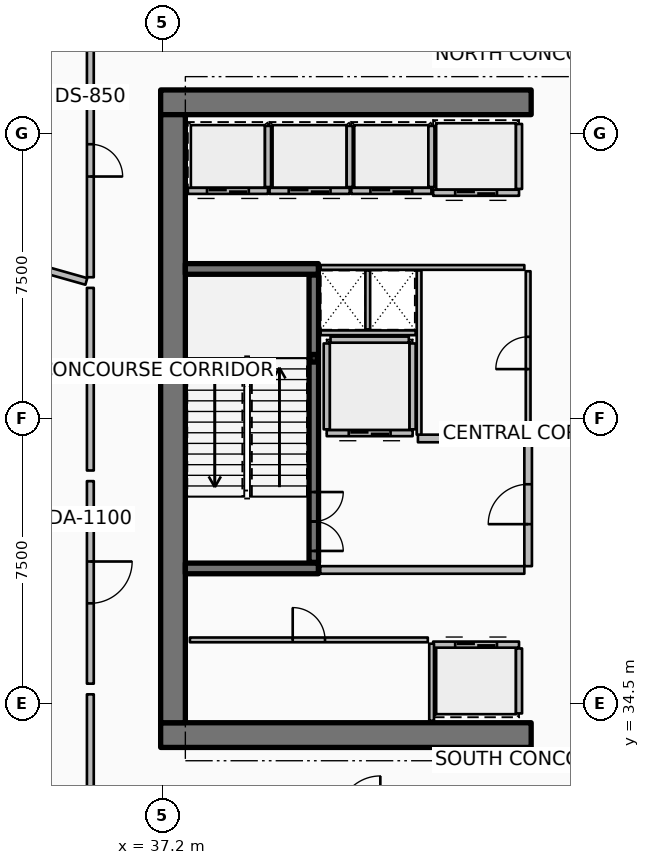
"""IFC4 building model, lengths in metres.
Left out: names, types, materials, properties, quantities, classifications, styles, units other than length and angle.
Written with IfcOpenShell. Run it as: python <this file> out.ifc"""

import sys

from ifc_helpers import new_model, si_unit, direction, frame, frame_2d, origin, origin_2d, place, context, subcontext, project, spatial, rectangle, hollow_rectangle, extrude, element, fill, save


model = new_model("IFC4")
c1 = context("Model", 3, precision=1e-05, world=origin(), true_north=direction((0.0, 1.0)))
c2 = subcontext(c1, "Body", "Model", "MODEL_VIEW")
j1 = project(units=[si_unit("LENGTHUNIT", "METRE"), si_unit("PLANEANGLEUNIT", "RADIAN")], contexts=[c1])
p1 = place(None, origin())
s1 = spatial("IfcSite", under=j1, at=p1, CompositionType="ELEMENT")
p2 = place(p1, origin())
s2 = spatial("IfcBuilding", under=s1, at=p2, CompositionType="ELEMENT")
p3 = place(p2, frame((0.0, 0.0, 231.9)))
s3 = spatial("IfcBuildingStorey", under=s2, at=p3, CompositionType="ELEMENT", Elevation=231.9)
for number, where, z_axis, x_axis in (
    (1, (37.15, 33.675, 0.0), (0.0, 0.0, 1.0), (1.0, 0.0, 0.0)),
    (2, (37.15, 50.325, 0.0), (0.0, 0.0, 1.0), (1.0, 0.0, 0.0)),
):
    element("IfcWall", number, at=place(p3, frame(where, z_axis=z_axis, x_axis=x_axis)), inside=s3, PredefinedType="SHEAR", context=c2, shape_type="SweptSolid", body=[
        extrude(rectangle(XDim=9.75, YDim=0.65, at=frame_2d((4.875, 0.0))), origin(), (0.0, 0.0, 1.0), 4.8),
    ])
p4 = place(p3, frame((37.475, 34.0, 0.0), z_axis=(0.0, 0.0, 1.0), x_axis=(0.0, 1.0, 0.0)))
e3 = element("IfcWall", 3, at=p4, inside=s3, PredefinedType="SHEAR", context=c2, shape_type="SweptSolid", body=[
    extrude(rectangle(XDim=16.0, YDim=0.65, at=frame_2d((8.0, 0.0))), origin(), (0.0, 0.0, 1.0), 4.8),
])
for number, where, z_axis, x_axis in (
    (4, (37.8, 38.06, 0.0), (0.0, 0.0, 1.0), (1.0, 0.0, 0.0)),
    (5, (37.8, 45.94, 0.0), (0.0, 0.0, 1.0), (1.0, 0.0, 0.0)),
):
    element("IfcWall", number, at=place(p3, frame(where, z_axis=z_axis, x_axis=x_axis)), inside=s3, PredefinedType="SHEAR", context=c2, shape_type="SweptSolid", body=[
        extrude(rectangle(XDim=3.5, YDim=0.28, at=frame_2d((1.75, 0.0))), origin(), (0.0, 0.0, 1.0), 4.8),
    ])
p5 = place(p3, frame((41.18, 43.59, 0.0), z_axis=(0.0, 0.0, 1.0), x_axis=(1.0, 0.0, 0.0)))
e6 = element("IfcColumn", 6, at=p5, inside=s3, PredefinedType="COLUMN", context=c2, shape_type="SweptSolid", body=[
    extrude(hollow_rectangle(XDim=0.2, YDim=0.2, WallThickness=0.01, InnerFilletRadius=0.01, OuterFilletRadius=0.02, at=origin_2d()), origin(), (0.0, 0.0, 1.0), 2.195),
])
p6 = place(p3, frame((41.18, 38.22, 0.0), z_axis=(0.0, 0.0, 1.0), x_axis=(0.0, 1.0, 0.0)))
e7 = element("IfcWall", 7, at=p6, inside=s3, PredefinedType="SOLIDWALL", context=c2, shape_type="SweptSolid", body=[
    extrude(rectangle(XDim=7.56, YDim=0.25, at=frame_2d((3.78, 0.0))), origin(), (0.0, 0.0, 1.0), 4.4),
])
p7 = place(p6, frame((0.3, 0.0, 0.0)))
e8 = element("IfcOpeningElement", 8, at=p7, cuts=e7, PredefinedType="OPENING", context=c2, shape_type="SweptSolid", body=[
    extrude(rectangle(XDim=1.55, YDim=2.15, at=frame_2d((0.775, 1.075))), frame((0.0, 0.135, 0.0), z_axis=(0.0, -1.0, 0.0), x_axis=(1.0, 0.0, 0.0)), (0.0, 0.0, 1.0), 0.27),
])
p8 = place(p3, frame((39.975, 47.995, 0.0), z_axis=(0.0, 0.0, 1.0), x_axis=(-1.0, 0.0, 0.0)))
e9 = element("IfcWall", 9, at=p8, inside=s3, PredefinedType="PARTITIONING", context=c2, shape_type="SweptSolid", body=[
    extrude(rectangle(XDim=2.11, YDim=0.16, at=frame_2d((1.055, 0.0))), origin(), (0.0, 0.0, 1.0), 4.4),
])
p9 = place(p8, frame((0.505, 0.0, 0.0)))
e10 = element("IfcOpeningElement", 10, at=p9, cuts=e9, PredefinedType="OPENING", context=c2, shape_type="SweptSolid", body=[
    extrude(rectangle(XDim=1.1, YDim=2.1, at=frame_2d((0.55, 1.05))), frame((0.0, 0.09, 0.0), z_axis=(0.0, -1.0, 0.0), x_axis=(1.0, 0.0, 0.0)), (0.0, 0.0, 1.0), 0.18),
])
p10 = place(p3, frame((39.975, 48.095, 0.0), z_axis=(0.0, 0.0, 1.0), x_axis=(0.0, 1.0, 0.0)))
e11 = element("IfcWall", 11, at=p10, inside=s3, PredefinedType="PARTITIONING", context=c2, shape_type="SweptSolid", body=[
    extrude(rectangle(XDim=1.61, YDim=0.16, at=frame_2d((0.805, 0.0))), origin(), (0.0, 0.0, 1.0), 4.4),
])
p11 = place(p3, frame((42.125, 47.995, 0.0), z_axis=(0.0, 0.0, 1.0), x_axis=(-1.0, 0.0, 0.0)))
e12 = element("IfcWall", 12, at=p11, inside=s3, PredefinedType="PARTITIONING", context=c2, shape_type="SweptSolid", body=[
    extrude(rectangle(XDim=2.11, YDim=0.16, at=frame_2d((1.055, 0.0))), origin(), (0.0, 0.0, 1.0), 4.4),
])
p12 = place(p11, frame((0.505, 0.0, 0.0)))
e13 = element("IfcOpeningElement", 13, at=p12, cuts=e12, PredefinedType="OPENING", context=c2, shape_type="SweptSolid", body=[
    extrude(rectangle(XDim=1.1, YDim=2.1, at=frame_2d((0.55, 1.05))), frame((0.0, 0.09, 0.0), z_axis=(0.0, -1.0, 0.0), x_axis=(1.0, 0.0, 0.0)), (0.0, 0.0, 1.0), 0.18),
])
p13 = place(p3, frame((42.125, 48.095, 0.0), z_axis=(0.0, 0.0, 1.0), x_axis=(0.0, 1.0, 0.0)))
e14 = element("IfcWall", 14, at=p13, inside=s3, PredefinedType="PARTITIONING", context=c2, shape_type="SweptSolid", body=[
    extrude(rectangle(XDim=1.61, YDim=0.16, at=frame_2d((0.805, 0.0))), origin(), (0.0, 0.0, 1.0), 4.4),
])
p14 = place(p3, frame((44.275, 47.995, 0.0), z_axis=(0.0, 0.0, 1.0), x_axis=(-1.0, 0.0, 0.0)))
e15 = element("IfcWall", 15, at=p14, inside=s3, PredefinedType="PARTITIONING", context=c2, shape_type="SweptSolid", body=[
    extrude(rectangle(XDim=2.11, YDim=0.16, at=frame_2d((1.055, 0.0))), origin(), (0.0, 0.0, 1.0), 4.4),
])
p15 = place(p14, frame((0.505, 0.0, 0.0)))
e16 = element("IfcOpeningElement", 16, at=p15, cuts=e15, PredefinedType="OPENING", context=c2, shape_type="SweptSolid", body=[
    extrude(rectangle(XDim=1.1, YDim=2.1, at=frame_2d((0.55, 1.05))), frame((0.0, 0.09, 0.0), z_axis=(0.0, -1.0, 0.0), x_axis=(1.0, 0.0, 0.0)), (0.0, 0.0, 1.0), 0.18),
])
p16 = place(p3, frame((44.275, 48.095, 0.0), z_axis=(0.0, 0.0, 1.0), x_axis=(0.0, 1.0, 0.0)))
e17 = element("IfcWall", 17, at=p16, inside=s3, PredefinedType="PARTITIONING", context=c2, shape_type="SweptSolid", body=[
    extrude(rectangle(XDim=1.61, YDim=0.16, at=frame_2d((0.805, 0.0))), origin(), (0.0, 0.0, 1.0), 4.4),
])
p17 = place(p3, frame((46.58, 47.945, 0.0), z_axis=(0.0, 0.0, 1.0), x_axis=(-1.0, 0.0, 0.0)))
e18 = element("IfcWall", 18, at=p17, inside=s3, PredefinedType="PARTITIONING", context=c2, shape_type="SweptSolid", body=[
    extrude(rectangle(XDim=2.26, YDim=0.16, at=frame_2d((1.13, 0.0))), origin(), (0.0, 0.0, 1.0), 4.4),
])
p18 = place(p17, frame((0.58, 0.0, 0.0)))
e19 = element("IfcOpeningElement", 19, at=p18, cuts=e18, PredefinedType="OPENING", context=c2, shape_type="SweptSolid", body=[
    extrude(rectangle(XDim=1.1, YDim=2.1, at=frame_2d((0.55, 1.05))), frame((0.0, 0.09, 0.0), z_axis=(0.0, -1.0, 0.0), x_axis=(1.0, 0.0, 0.0)), (0.0, 0.0, 1.0), 0.18),
])
p19 = place(p3, frame((46.58, 48.045, 0.0), z_axis=(0.0, 0.0, 1.0), x_axis=(0.0, 1.0, 0.0)))
e20 = element("IfcWall", 20, at=p19, inside=s3, PredefinedType="PARTITIONING", context=c2, shape_type="SweptSolid", body=[
    extrude(rectangle(XDim=1.71, YDim=0.16, at=frame_2d((0.855, 0.0))), origin(), (0.0, 0.0, 1.0), 4.4),
])
p20 = place(p3, frame((44.32, 36.055, 0.0), z_axis=(0.0, 0.0, 1.0), x_axis=(1.0, 0.0, 0.0)))
e21 = element("IfcWall", 21, at=p20, inside=s3, PredefinedType="PARTITIONING", context=c2, shape_type="SweptSolid", body=[
    extrude(rectangle(XDim=2.26, YDim=0.16, at=frame_2d((1.13, 0.0))), origin(), (0.0, 0.0, 1.0), 4.4),
])
p21 = place(p20, frame((0.58, 0.0, 0.0)))
e22 = element("IfcOpeningElement", 22, at=p21, cuts=e21, PredefinedType="OPENING", context=c2, shape_type="SweptSolid", body=[
    extrude(rectangle(XDim=1.1, YDim=2.1, at=frame_2d((0.55, 1.05))), frame((0.0, 0.09, 0.0), z_axis=(0.0, -1.0, 0.0), x_axis=(1.0, 0.0, 0.0)), (0.0, 0.0, 1.0), 0.18),
])
p22 = place(p3, frame((46.58, 34.245, 0.0), z_axis=(0.0, 0.0, 1.0), x_axis=(0.0, 1.0, 0.0)))
e23 = element("IfcWall", 23, at=p22, inside=s3, PredefinedType="PARTITIONING", context=c2, shape_type="SweptSolid", body=[
    extrude(rectangle(XDim=1.71, YDim=0.16, at=frame_2d((0.855, 0.0))), origin(), (0.0, 0.0, 1.0), 4.4),
])
p23 = place(p3, frame((43.78, 41.62, 0.0), z_axis=(0.0, 0.0, 1.0), x_axis=(-1.0, 0.0, 0.0)))
e24 = element("IfcWall", 24, at=p23, inside=s3, PredefinedType="PARTITIONING", context=c2, shape_type="SweptSolid", body=[
    extrude(rectangle(XDim=2.26, YDim=0.16, at=frame_2d((1.13, 0.0))), origin(), (0.0, 0.0, 1.0), 4.4),
])
p24 = place(p23, frame((0.58, 0.0, 0.0)))
e25 = element("IfcOpeningElement", 25, at=p24, cuts=e24, PredefinedType="OPENING", context=c2, shape_type="SweptSolid", body=[
    extrude(rectangle(XDim=1.1, YDim=2.1, at=frame_2d((0.55, 1.05))), frame((0.0, 0.09, 0.0), z_axis=(0.0, -1.0, 0.0), x_axis=(1.0, 0.0, 0.0)), (0.0, 0.0, 1.0), 0.18),
])
for number, where, z_axis, x_axis in (
    (26, (43.78, 41.72, 0.0), (0.0, 0.0, 1.0), (0.0, 1.0, 0.0)),
    (27, (41.52, 41.72, 0.0), (0.0, 0.0, 1.0), (0.0, 1.0, 0.0)),
):
    element("IfcWall", number, at=place(p3, frame(where, z_axis=z_axis, x_axis=x_axis)), inside=s3, PredefinedType="PARTITIONING", context=c2, shape_type="SweptSolid", body=[
        extrude(rectangle(XDim=2.26, YDim=0.16, at=frame_2d((1.13, 0.0))), origin(), (0.0, 0.0, 1.0), 4.4),
    ])
p25 = place(p3, frame((41.62, 44.08, 0.0), z_axis=(0.0, 0.0, 1.0), x_axis=(1.0, 0.0, 0.0)))
e28 = element("IfcWall", 28, at=p25, inside=s3, PredefinedType="PARTITIONING", context=c2, shape_type="SweptSolid", body=[
    extrude(rectangle(XDim=2.06, YDim=0.16, at=frame_2d((1.03, 0.0))), origin(), (0.0, 0.0, 1.0), 4.4),
])
p26 = place(p3, frame((44.28, 34.05, 0.0), z_axis=(0.0, 0.0, 1.0), x_axis=(0.0, 1.0, 0.0)))
e29 = element("IfcWall", 29, at=p26, inside=s3, PredefinedType="PARTITIONING", context=c2, shape_type="SweptSolid", body=[
    extrude(rectangle(XDim=2.03, YDim=0.125, at=frame_2d((1.015, 0.0))), origin(), (0.0, 0.0, 1.0), 3.84),
])
p27 = place(p3, frame((37.92, 36.18, 0.0), z_axis=(0.0, 0.0, 1.0), x_axis=(1.0, 0.0, 0.0)))
e30 = element("IfcWall", 30, at=p27, inside=s3, PredefinedType="PARTITIONING", context=c2, shape_type="SweptSolid", body=[
    extrude(rectangle(XDim=6.26, YDim=0.125, at=frame_2d((3.13, 0.0))), origin(), (0.0, 0.0, 1.0), 3.84),
])
p28 = place(p27, frame((2.705, 0.0, 0.0)))
e31 = element("IfcOpeningElement", 31, at=p28, cuts=e30, PredefinedType="OPENING", context=c2, shape_type="SweptSolid", body=[
    extrude(rectangle(XDim=0.85, YDim=2.06, at=frame_2d((0.425, 1.03))), frame((0.0, 0.073, 0.0), z_axis=(0.0, -1.0, 0.0), x_axis=(1.0, 0.0, 0.0)), (0.0, 0.0, 1.0), 0.145),
])
p29 = place(p3, frame((41.35, 38.02, 0.0), z_axis=(0.0, 0.0, 1.0), x_axis=(1.0, 0.0, 0.0)))
e32 = element("IfcWall", 32, at=p29, inside=s3, PredefinedType="PARTITIONING", context=c2, shape_type="SweptSolid", body=[
    extrude(rectangle(XDim=5.37, YDim=0.2, at=frame_2d((2.685, 0.0))), origin(), (0.0, 0.0, 1.0), 4.4),
])
p30 = place(p3, frame((43.92, 41.48, 0.0), z_axis=(0.0, 0.0, 1.0), x_axis=(1.0, 0.0, 0.0)))
e33 = element("IfcWall", 33, at=p30, inside=s3, PredefinedType="PARTITIONING", context=c2, shape_type="SweptSolid", body=[
    extrude(rectangle(XDim=2.8, YDim=0.2, at=frame_2d((1.4, 0.0))), origin(), (0.0, 0.0, 1.0), 4.4),
])
p31 = place(p3, frame((46.82, 38.12, 0.0), z_axis=(0.0, 0.0, 1.0), x_axis=(0.0, 1.0, 0.0)))
e34 = element("IfcWall", 34, at=p31, inside=s3, PredefinedType="PARTITIONING", context=c2, shape_type="SweptSolid", body=[
    extrude(rectangle(XDim=3.26, YDim=0.2, at=frame_2d((1.63, 0.0))), origin(), (0.0, 0.0, 1.0), 4.4),
])
p32 = place(p31, frame((1.105, 0.0, 0.0)))
e35 = element("IfcOpeningElement", 35, at=p32, cuts=e34, PredefinedType="OPENING", context=c2, shape_type="SweptSolid", body=[
    extrude(rectangle(XDim=1.05, YDim=2.1, at=frame_2d((0.525, 1.05))), frame((0.0, 0.11, 0.0), z_axis=(0.0, -1.0, 0.0), x_axis=(1.0, 0.0, 0.0)), (0.0, 0.0, 1.0), 0.22),
])
p33 = place(p3, frame((41.36, 45.98, 0.0), z_axis=(0.0, 0.0, 1.0), x_axis=(1.0, 0.0, 0.0)))
e36 = element("IfcWall", 36, at=p33, inside=s3, PredefinedType="PARTITIONING", context=c2, shape_type="SweptSolid", body=[
    extrude(rectangle(XDim=5.36, YDim=0.125, at=frame_2d((2.68, 0.0))), origin(), (0.0, 0.0, 1.0), 3.84),
])
p34 = place(p3, frame((41.36, 44.26, 0.0), z_axis=(0.0, 0.0, 1.0), x_axis=(1.0, 0.0, 0.0)))
e37 = element("IfcWall", 37, at=p34, inside=s3, PredefinedType="PARTITIONING", context=c2, shape_type="SweptSolid", body=[
    extrude(rectangle(XDim=2.5, YDim=0.125, at=frame_2d((1.25, 0.0))), origin(), (0.0, 0.0, 1.0), 3.84),
])
p35 = place(p3, frame((42.6, 44.35, 0.0), z_axis=(0.0, 0.0, 1.0), x_axis=(0.0, 1.0, 0.0)))
e38 = element("IfcWall", 38, at=p35, inside=s3, PredefinedType="PARTITIONING", context=c2, shape_type="SweptSolid", body=[
    extrude(rectangle(XDim=1.55, YDim=0.125, at=frame_2d((0.775, 0.0))), origin(), (0.0, 0.0, 1.0), 3.84),
])
p36 = place(p3, frame((43.95, 41.58, 0.0), z_axis=(0.0, 0.0, 1.0), x_axis=(0.0, 1.0, 0.0)))
e39 = element("IfcWall", 39, at=p36, inside=s3, PredefinedType="PARTITIONING", context=c2, shape_type="SweptSolid", body=[
    extrude(rectangle(XDim=4.32, YDim=0.125, at=frame_2d((2.16, 0.0))), origin(), (0.0, 0.0, 1.0), 3.84),
])
p37 = place(p3, frame((46.82, 41.58, 0.0), z_axis=(0.0, 0.0, 1.0), x_axis=(0.0, 1.0, 0.0)))
e40 = element("IfcWall", 40, at=p37, inside=s3, PredefinedType="PARTITIONING", context=c2, shape_type="SweptSolid", body=[
    extrude(rectangle(XDim=4.3, YDim=0.125, at=frame_2d((2.15, 0.0))), origin(), (0.0, 0.0, 1.0), 3.84),
])
p38 = place(p37, frame((1.725, 0.0, 0.0)))
e41 = element("IfcOpeningElement", 41, at=p38, cuts=e40, PredefinedType="OPENING", context=c2, shape_type="SweptSolid", body=[
    extrude(rectangle(XDim=0.85, YDim=2.06, at=frame_2d((0.425, 1.03))), frame((0.0, 0.073, 0.0), z_axis=(0.0, -1.0, 0.0), x_axis=(1.0, 0.0, 0.0)), (0.0, 0.0, 1.0), 0.145),
])
p39 = place(p3, frame((35.3, 51.872, 0.0), z_axis=(0.0, 0.0, 1.0), x_axis=(0.0, -1.0, 0.0)))
e42 = element("IfcWall", 42, at=p39, inside=s3, PredefinedType="PARTITIONING", context=c2, shape_type="SweptSolid", body=[
    extrude(rectangle(XDim=6.15, YDim=0.18, at=frame_2d((3.075, 0.0))), origin(), (0.0, 0.0, 1.0), 3.357),
])
p40 = place(p39, frame((2.65, 0.0, 0.0)))
e43 = element("IfcOpeningElement", 43, at=p40, cuts=e42, PredefinedType="OPENING", context=c2, shape_type="SweptSolid", body=[
    extrude(rectangle(XDim=0.85, YDim=2.06, at=frame_2d((0.425, 1.03))), frame((0.0, 0.1, 0.0), z_axis=(0.0, -1.0, 0.0), x_axis=(1.0, 0.0, 0.0)), (0.0, 0.0, 1.0), 0.2),
])
p41 = place(p3, frame((35.194, 45.612, 0.0), z_axis=(0.0, 0.0, 1.0), x_axis=(-0.962460537185, 0.271421654186, 0.0)))
e44 = element("IfcWall", 44, at=p41, inside=s3, PredefinedType="PARTITIONING", context=c2, shape_type="SweptSolid", body=[
    extrude(rectangle(XDim=15.057, YDim=0.18, at=frame_2d((7.529, 0.0))), origin(), (0.0, 0.0, 1.0), 3.357),
])
p42 = place(p3, frame((35.3, 45.442, 0.0), z_axis=(0.0, 0.0, 1.0), x_axis=(0.0, -1.0, 0.0)))
e45 = element("IfcWall", 45, at=p42, inside=s3, PredefinedType="PARTITIONING", context=c2, shape_type="SweptSolid", body=[
    extrude(rectangle(XDim=4.805, YDim=0.18, at=frame_2d((2.402, 0.0))), origin(), (0.0, 0.0, 1.0), 3.357),
])
p43 = place(p3, frame((35.3, 40.357, 0.0), z_axis=(0.0, 0.0, 1.0), x_axis=(0.0, -1.0, 0.0)))
e46 = element("IfcWall", 46, at=p43, inside=s3, PredefinedType="PARTITIONING", context=c2, shape_type="SweptSolid", body=[
    extrude(rectangle(XDim=5.329, YDim=0.18, at=frame_2d((2.665, 0.0))), origin(), (0.0, 0.0, 1.0), 3.357),
])
p44 = place(p43, frame((2.115, 0.0, 0.0)))
e47 = element("IfcOpeningElement", 47, at=p44, cuts=e46, PredefinedType="OPENING", context=c2, shape_type="SweptSolid", body=[
    extrude(rectangle(XDim=1.1, YDim=2.1, at=frame_2d((0.55, 1.05))), frame((0.0, 0.1, 0.0), z_axis=(0.0, -1.0, 0.0), x_axis=(1.0, 0.0, 0.0)), (0.0, 0.0, 1.0), 0.2),
])
p45 = place(p3, frame((35.3, 34.748, 0.0), z_axis=(0.0, 0.0, 1.0), x_axis=(0.0, -1.0, 0.0)))
e48 = element("IfcWall", 48, at=p45, inside=s3, PredefinedType="PARTITIONING", context=c2, shape_type="SweptSolid", body=[
    extrude(rectangle(XDim=3.108, YDim=0.18, at=frame_2d((1.554, 0.0))), origin(), (0.0, 0.0, 1.0), 3.357),
])
p46 = place(p7, origin())
e49 = element("IfcDoor", 49, at=p46, inside=s3, OperationType="DOUBLE_DOOR_SINGLE_SWING", PredefinedType="DOOR", context=c2, shape_type="SweptSolid", body=[
    extrude(rectangle(XDim=1.55, YDim=2.15, at=frame_2d((0.775, 1.075))), frame((0.0, 0.025, 0.0), z_axis=(0.0, -1.0, 0.0), x_axis=(1.0, 0.0, 0.0)), (0.0, 0.0, 1.0), 0.05),
])
fill(e8, e49)
p47 = place(p9, origin())
e50 = element("IfcDoor", 50, at=p47, inside=s3, OperationType="DOUBLE_DOOR_SLIDING", PredefinedType="DOOR", context=c2, shape_type="SweptSolid", body=[
    extrude(rectangle(XDim=1.1, YDim=2.1, at=frame_2d((0.55, 1.05))), frame((0.0, 0.025, 0.0), z_axis=(0.0, -1.0, 0.0), x_axis=(1.0, 0.0, 0.0)), (0.0, 0.0, 1.0), 0.05),
])
fill(e10, e50)
p48 = place(p12, origin())
e51 = element("IfcDoor", 51, at=p48, inside=s3, OperationType="DOUBLE_DOOR_SLIDING", PredefinedType="DOOR", context=c2, shape_type="SweptSolid", body=[
    extrude(rectangle(XDim=1.1, YDim=2.1, at=frame_2d((0.55, 1.05))), frame((0.0, 0.025, 0.0), z_axis=(0.0, -1.0, 0.0), x_axis=(1.0, 0.0, 0.0)), (0.0, 0.0, 1.0), 0.05),
])
fill(e13, e51)
p49 = place(p15, origin())
e52 = element("IfcDoor", 52, at=p49, inside=s3, OperationType="DOUBLE_DOOR_SLIDING", PredefinedType="DOOR", context=c2, shape_type="SweptSolid", body=[
    extrude(rectangle(XDim=1.1, YDim=2.1, at=frame_2d((0.55, 1.05))), frame((0.0, 0.025, 0.0), z_axis=(0.0, -1.0, 0.0), x_axis=(1.0, 0.0, 0.0)), (0.0, 0.0, 1.0), 0.05),
])
fill(e16, e52)
p50 = place(p18, origin())
e53 = element("IfcDoor", 53, at=p50, inside=s3, OperationType="DOUBLE_DOOR_SLIDING", PredefinedType="DOOR", context=c2, shape_type="SweptSolid", body=[
    extrude(rectangle(XDim=1.1, YDim=2.1, at=frame_2d((0.55, 1.05))), frame((0.0, 0.025, 0.0), z_axis=(0.0, -1.0, 0.0), x_axis=(1.0, 0.0, 0.0)), (0.0, 0.0, 1.0), 0.05),
])
fill(e19, e53)
p51 = place(p21, origin())
e54 = element("IfcDoor", 54, at=p51, inside=s3, OperationType="DOUBLE_DOOR_SLIDING", PredefinedType="DOOR", context=c2, shape_type="SweptSolid", body=[
    extrude(rectangle(XDim=1.1, YDim=2.1, at=frame_2d((0.55, 1.05))), frame((0.0, 0.025, 0.0), z_axis=(0.0, -1.0, 0.0), x_axis=(1.0, 0.0, 0.0)), (0.0, 0.0, 1.0), 0.05),
])
fill(e22, e54)
p52 = place(p24, origin())
e55 = element("IfcDoor", 55, at=p52, inside=s3, OperationType="DOUBLE_DOOR_SLIDING", PredefinedType="DOOR", context=c2, shape_type="SweptSolid", body=[
    extrude(rectangle(XDim=1.1, YDim=2.1, at=frame_2d((0.55, 1.05))), frame((0.0, 0.025, 0.0), z_axis=(0.0, -1.0, 0.0), x_axis=(1.0, 0.0, 0.0)), (0.0, 0.0, 1.0), 0.05),
])
fill(e25, e55)
p53 = place(p28, origin())
e56 = element("IfcDoor", 56, at=p53, inside=s3, OperationType="SINGLE_SWING_LEFT", PredefinedType="DOOR", context=c2, shape_type="SweptSolid", body=[
    extrude(rectangle(XDim=0.85, YDim=2.06, at=frame_2d((0.425, 1.03))), frame((0.0, 0.025, 0.0), z_axis=(0.0, -1.0, 0.0), x_axis=(1.0, 0.0, 0.0)), (0.0, 0.0, 1.0), 0.05),
])
fill(e31, e56)
p54 = place(p32, origin())
e57 = element("IfcDoor", 57, at=p54, inside=s3, OperationType="SINGLE_SWING_LEFT", PredefinedType="DOOR", context=c2, shape_type="SweptSolid", body=[
    extrude(rectangle(XDim=1.05, YDim=2.1, at=frame_2d((0.525, 1.05))), frame((0.0, 0.025, 0.0), z_axis=(0.0, -1.0, 0.0), x_axis=(1.0, 0.0, 0.0)), (0.0, 0.0, 1.0), 0.05),
])
fill(e35, e57)
p55 = place(p38, origin())
e58 = element("IfcDoor", 58, at=p55, inside=s3, OperationType="SINGLE_SWING_LEFT", PredefinedType="DOOR", context=c2, shape_type="SweptSolid", body=[
    extrude(rectangle(XDim=0.85, YDim=2.06, at=frame_2d((0.425, 1.03))), frame((0.0, 0.025, 0.0), z_axis=(0.0, -1.0, 0.0), x_axis=(1.0, 0.0, 0.0)), (0.0, 0.0, 1.0), 0.05),
])
fill(e41, e58)
p56 = place(p40, origin())
e59 = element("IfcDoor", 59, at=p56, inside=s3, OperationType="SINGLE_SWING_RIGHT", PredefinedType="DOOR", context=c2, shape_type="SweptSolid", body=[
    extrude(rectangle(XDim=0.85, YDim=2.06, at=frame_2d((0.425, 1.03))), frame((0.0, 0.025, 0.0), z_axis=(0.0, -1.0, 0.0), x_axis=(1.0, 0.0, 0.0)), (0.0, 0.0, 1.0), 0.05),
])
fill(e43, e59)
p57 = place(p44, origin())
e60 = element("IfcDoor", 60, at=p57, inside=s3, OperationType="SINGLE_SWING_LEFT", PredefinedType="DOOR", context=c2, shape_type="SweptSolid", body=[
    extrude(rectangle(XDim=1.1, YDim=2.1, at=frame_2d((0.55, 1.05))), frame((0.0, 0.025, 0.0), z_axis=(0.0, -1.0, 0.0), x_axis=(1.0, 0.0, 0.0)), (0.0, 0.0, 1.0), 0.05),
])
fill(e47, e60)
save(model, sys.argv[1])
